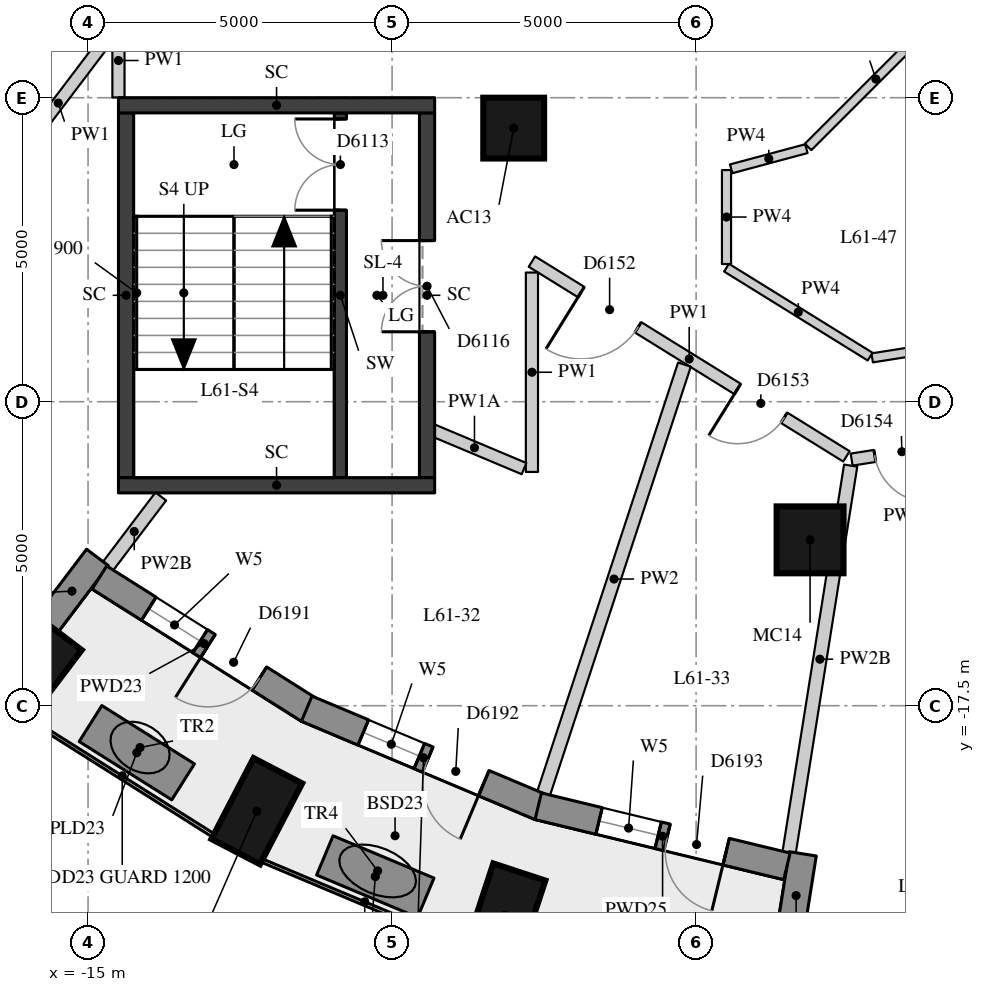
"""IFC4 building model, lengths in metres.
Left out: names, types, materials, properties, quantities, classifications, styles, units other than length and angle.
Written with IfcOpenShell. Run it as: python <this file> out.ifc"""

import sys

from ifc_helpers import new_model, si_unit, direction, frame, frame_2d, origin, origin_2d, place, context, subcontext, project, spatial, rectangle, extrude, element, fill, save


model = new_model("IFC4")
c1 = context("Model", 3, precision=1e-05, world=origin(), true_north=direction((0.0, 1.0)))
c2 = subcontext(c1, "Body", "Model", "MODEL_VIEW")
j1 = project(units=[si_unit("LENGTHUNIT", "METRE"), si_unit("PLANEANGLEUNIT", "RADIAN")], contexts=[c1])
p1 = place(None, origin())
s1 = spatial("IfcSite", under=j1, at=p1, CompositionType="ELEMENT")
p2 = place(p1, origin())
s2 = spatial("IfcBuilding", under=s1, at=p2, CompositionType="ELEMENT")
p3 = place(p2, frame((0.0, 0.0, 215.6)))
s3 = spatial("IfcBuildingStorey", under=s2, at=p3, CompositionType="ELEMENT", Elevation=215.6)
for number, where, z_axis, x_axis in (
    (1, (-15.916, -16.911, 0.0), (0.0, 0.0, 1.0), (-0.604, -0.797, 0.0)),
    (2, (-12.225, -19.235, 0.0), (0.0, 0.0, 1.0), (-0.462, -0.887, 0.0)),
    (3, (-8.141, -20.948, 0.0), (0.0, 0.0, 1.0), (-0.312, -0.95, 0.0)),
):
    element("IfcColumn", number, at=place(p3, frame(where, z_axis=z_axis, x_axis=x_axis)), inside=s3, PredefinedType="COLUMN", context=c2, shape_type="SweptSolid", body=[
        extrude(rectangle(XDim=1.5, YDim=0.9, at=origin_2d()), origin(), (0.0, 0.0, 1.0), 3.3),
    ])
p4 = place(p3, frame((-8.0, -8.0, 0.0), z_axis=(0.0, 0.0, 1.0), x_axis=(1.0, 0.0, 0.0)))
e4 = element("IfcColumn", 4, at=p4, inside=s3, PredefinedType="COLUMN", context=c2, shape_type="SweptSolid", body=[
    extrude(rectangle(XDim=1.0, YDim=1.0, at=origin_2d()), origin(), (0.0, 0.0, 1.0), 3.3),
])
p5 = place(p3, frame((-3.126, -14.772, 0.0), z_axis=(0.0, 0.0, 1.0), x_axis=(1.0, 0.0, 0.0)))
e5 = element("IfcColumn", 5, at=p5, inside=s3, PredefinedType="COLUMN", context=c2, shape_type="SweptSolid", body=[
    extrude(rectangle(XDim=1.1, YDim=1.1, at=origin_2d()), origin(), (0.0, 0.0, 1.0), 3.3),
])
p6 = place(p3, frame((-15.685, -16.17, 0.0), z_axis=(0.0, 0.0, 1.0), x_axis=(0.603644757989, 0.797253414011, 0.0)))
e6 = element("IfcWall", 6, at=p6, inside=s3, PredefinedType="SOLIDWALL", context=c2, shape_type="SweptSolid", body=[
    extrude(rectangle(XDim=1.391, YDim=0.45, at=frame_2d((0.695, 0.0))), origin(), (0.0, 0.0, 1.0), 2.57),
])
p7 = place(p3, frame((-3.464, -21.309, 0.0), z_axis=(0.0, 0.0, 1.0), x_axis=(0.157161757203, 0.98757287431, 0.0)))
e7 = element("IfcWall", 7, at=p7, inside=s3, PredefinedType="SOLIDWALL", context=c2, shape_type="SweptSolid", body=[
    extrude(rectangle(XDim=1.39, YDim=0.45, at=frame_2d((0.695, 0.0))), origin(), (0.0, 0.0, 1.0), 2.57),
])
p8 = place(p3, frame((-14.813, -15.392, 0.0), z_axis=(0.0, 0.0, 1.0), x_axis=(0.84545185308, -0.534051649303, 0.0)))
e8 = element("IfcWall", 8, at=p8, inside=s3, PredefinedType="SOLIDWALL", context=c2, shape_type="SweptSolid", body=[
    extrude(rectangle(XDim=4.071, YDim=0.45, at=frame_2d((2.036, 0.0))), origin(), (0.0, 0.0, 1.0), 3.02),
])
p9 = place(p8, frame((0.961, 0.0, 0.4)))
e9 = element("IfcOpeningElement", 9, at=p9, cuts=e8, PredefinedType="OPENING", context=c2, shape_type="SweptSolid", body=[
    extrude(rectangle(XDim=1.0, YDim=1.75, at=frame_2d((0.5, 0.875))), frame((0.0, 0.235, 0.0), z_axis=(0.0, -1.0, 0.0), x_axis=(1.0, 0.0, 0.0)), (0.0, 0.0, 1.0), 0.47),
])
p10 = place(p8, frame((2.111, 0.0, 0.0)))
e10 = element("IfcOpeningElement", 10, at=p10, cuts=e8, PredefinedType="OPENING", context=c2, shape_type="SweptSolid", body=[
    extrude(rectangle(XDim=1.0, YDim=2.15, at=frame_2d((0.5, 1.075))), frame((0.0, 0.235, 0.0), z_axis=(0.0, -1.0, 0.0), x_axis=(1.0, 0.0, 0.0)), (0.0, 0.0, 1.0), 0.47),
])
p11 = place(p3, frame((-11.404, -17.549, 0.0), z_axis=(0.0, 0.0, 1.0), x_axis=(0.921751093055, -0.387782055351, 0.0)))
e11 = element("IfcWall", 11, at=p11, inside=s3, PredefinedType="SOLIDWALL", context=c2, shape_type="SweptSolid", body=[
    extrude(rectangle(XDim=4.168, YDim=0.45, at=frame_2d((2.084, 0.0))), origin(), (0.0, 0.0, 1.0), 3.02),
])
p12 = place(p11, frame((1.009, 0.0, 0.4)))
e12 = element("IfcOpeningElement", 12, at=p12, cuts=e11, PredefinedType="OPENING", context=c2, shape_type="SweptSolid", body=[
    extrude(rectangle(XDim=1.0, YDim=1.75, at=frame_2d((0.5, 0.875))), frame((0.0, 0.235, 0.0), z_axis=(0.0, -1.0, 0.0), x_axis=(1.0, 0.0, 0.0)), (0.0, 0.0, 1.0), 0.47),
])
p13 = place(p11, frame((2.159, 0.0, 0.0)))
e13 = element("IfcOpeningElement", 13, at=p13, cuts=e11, PredefinedType="OPENING", context=c2, shape_type="SweptSolid", body=[
    extrude(rectangle(XDim=1.0, YDim=2.15, at=frame_2d((0.5, 1.075))), frame((0.0, 0.235, 0.0), z_axis=(0.0, -1.0, 0.0), x_axis=(1.0, 0.0, 0.0)), (0.0, 0.0, 1.0), 0.47),
])
p14 = place(p3, frame((-7.596, -19.154, 0.0), z_axis=(0.0, 0.0, 1.0), x_axis=(0.972004107579, -0.234963858602, 0.0)))
e14 = element("IfcWall", 14, at=p14, inside=s3, PredefinedType="SOLIDWALL", context=c2, shape_type="SweptSolid", body=[
    extrude(rectangle(XDim=4.207, YDim=0.45, at=frame_2d((2.104, 0.0))), origin(), (0.0, 0.0, 1.0), 3.02),
])
p15 = place(p14, frame((1.029, 0.0, 0.4)))
e15 = element("IfcOpeningElement", 15, at=p15, cuts=e14, PredefinedType="OPENING", context=c2, shape_type="SweptSolid", body=[
    extrude(rectangle(XDim=1.0, YDim=1.75, at=frame_2d((0.5, 0.875))), frame((0.0, 0.235, 0.0), z_axis=(0.0, -1.0, 0.0), x_axis=(1.0, 0.0, 0.0)), (0.0, 0.0, 1.0), 0.47),
])
p16 = place(p14, frame((2.179, 0.0, 0.0)))
e16 = element("IfcOpeningElement", 16, at=p16, cuts=e14, PredefinedType="OPENING", context=c2, shape_type="SweptSolid", body=[
    extrude(rectangle(XDim=1.0, YDim=2.15, at=frame_2d((0.5, 1.075))), frame((0.0, 0.235, 0.0), z_axis=(0.0, -1.0, 0.0), x_axis=(1.0, 0.0, 0.0)), (0.0, 0.0, 1.0), 0.47),
])
p17 = place(p3, frame((-14.96, -17.793, 0.0), z_axis=(0.0, 0.0, 1.0), x_axis=(0.846126379677, -0.532982316418, 0.0)))
e17 = element("IfcWall", 17, at=p17, inside=s3, PredefinedType="USERDEFINED", context=c2, shape_type="SweptSolid", body=[
    extrude(rectangle(XDim=1.8, YDim=0.7, at=frame_2d((0.9, 0.0))), origin(), (0.0, 0.0, 1.0), 0.75),
])
p18 = place(p3, frame((-11.106, -19.962, 0.0), z_axis=(0.0, 0.0, 1.0), x_axis=(0.922155368213, -0.386819695564, 0.0)))
e18 = element("IfcWall", 18, at=p18, inside=s3, PredefinedType="USERDEFINED", context=c2, shape_type="SweptSolid", body=[
    extrude(rectangle(XDim=1.8, YDim=0.7, at=frame_2d((0.9, 0.0))), origin(), (0.0, 0.0, 1.0), 0.75),
])
p19 = place(p3, frame((-10.85, -13.75, 0.0), z_axis=(0.0, 0.0, 1.0), x_axis=(0.0, 1.0, 0.0)))
e19 = element("IfcWall", 19, at=p19, inside=s3, PredefinedType="SHEAR", context=c2, shape_type="SweptSolid", body=[
    extrude(rectangle(XDim=6.0, YDim=0.2, at=frame_2d((3.0, 0.0))), origin(), (0.0, 0.0, 1.0), 3.02),
])
p20 = place(p19, frame((4.4, 0.0, 0.0)))
e20 = element("IfcOpeningElement", 20, at=p20, cuts=e19, PredefinedType="OPENING", context=c2, shape_type="SweptSolid", body=[
    extrude(rectangle(XDim=1.5, YDim=2.1, at=frame_2d((0.75, 1.05))), frame((0.0, 0.11, 0.0), z_axis=(0.0, -1.0, 0.0), x_axis=(1.0, 0.0, 0.0)), (0.0, 0.0, 1.0), 0.22),
])
p21 = place(p3, frame((-14.375, -13.75, -0.28), z_axis=(0.0, 0.0, 1.0), x_axis=(0.0, 1.0, 0.0)))
e21 = element("IfcWall", 21, at=p21, inside=s3, PredefinedType="SHEAR", context=c2, shape_type="SweptSolid", body=[
    extrude(rectangle(XDim=6.0, YDim=0.25, at=frame_2d((3.0, 0.0))), origin(), (0.0, 0.0, 1.0), 3.3),
])
p22 = place(p3, frame((-9.425, -13.75, -0.28), z_axis=(0.0, 0.0, 1.0), x_axis=(0.0, 1.0, 0.0)))
e22 = element("IfcWall", 22, at=p22, inside=s3, PredefinedType="SHEAR", context=c2, shape_type="SweptSolid", body=[
    extrude(rectangle(XDim=6.0, YDim=0.25, at=frame_2d((3.0, 0.0))), origin(), (0.0, 0.0, 1.0), 3.3),
])
p23 = place(p22, frame((2.4, 0.0, 0.28)))
e23 = element("IfcOpeningElement", 23, at=p23, cuts=e22, PredefinedType="OPENING", context=c2, shape_type="SweptSolid", body=[
    extrude(rectangle(XDim=1.5, YDim=2.1, at=frame_2d((0.75, 1.05))), frame((0.0, 0.135, 0.0), z_axis=(0.0, -1.0, 0.0), x_axis=(1.0, 0.0, 0.0)), (0.0, 0.0, 1.0), 0.27),
])
for number, where, z_axis, x_axis in (
    (24, (-14.5, -7.625, -0.28), (0.0, 0.0, 1.0), (1.0, 0.0, 0.0)),
    (25, (-14.5, -13.875, -0.28), (0.0, 0.0, 1.0), (1.0, 0.0, 0.0)),
):
    element("IfcWall", number, at=place(p3, frame(where, z_axis=z_axis, x_axis=x_axis)), inside=s3, PredefinedType="SHEAR", context=c2, shape_type="SweptSolid", body=[
        extrude(rectangle(XDim=5.2, YDim=0.25, at=frame_2d((2.6, 0.0))), origin(), (0.0, 0.0, 1.0), 3.3),
    ])
p24 = place(p3, frame((9.306, -11.603, 0.0), z_axis=(0.0, 0.0, 1.0), x_axis=(-0.987842562114, -0.155457622769, 0.0)))
e26 = element("IfcWall", 26, at=p24, inside=s3, PredefinedType="PARTITIONING", context=c2, shape_type="SweptSolid", body=[
    extrude(rectangle(XDim=11.893, YDim=0.2, at=frame_2d((5.947, 0.0))), origin(), (0.0, 0.0, 1.0), 3.02),
])
p25 = place(p24, frame((10.607, 0.0, 0.0)))
e27 = element("IfcOpeningElement", 27, at=p25, cuts=e26, PredefinedType="OPENING", context=c2, shape_type="SweptSolid", body=[
    extrude(rectangle(XDim=0.9, YDim=2.1, at=frame_2d((0.45, 1.05))), frame((0.0, 0.11, 0.0), z_axis=(0.0, -1.0, 0.0), x_axis=(1.0, 0.0, 0.0)), (0.0, 0.0, 1.0), 0.22),
])
p26 = place(p24, frame((5.829, 0.0, 0.0)))
e28 = element("IfcOpeningElement", 28, at=p26, cuts=e26, PredefinedType="OPENING", context=c2, shape_type="SweptSolid", body=[
    extrude(rectangle(XDim=0.9, YDim=2.1, at=frame_2d((0.45, 1.05))), frame((0.0, 0.11, 0.0), z_axis=(0.0, -1.0, 0.0), x_axis=(1.0, 0.0, 0.0)), (0.0, 0.0, 1.0), 0.22),
])
p27 = place(p24, frame((4.669, 0.0, 0.0)))
e29 = element("IfcOpeningElement", 29, at=p27, cuts=e26, PredefinedType="OPENING", context=c2, shape_type="SweptSolid", body=[
    extrude(rectangle(XDim=0.9, YDim=2.1, at=frame_2d((0.45, 1.05))), frame((0.0, 0.11, 0.0), z_axis=(0.0, -1.0, 0.0), x_axis=(1.0, 0.0, 0.0)), (0.0, 0.0, 1.0), 0.22),
])
p28 = place(p24, frame((0.14, 0.0, 0.0)))
e30 = element("IfcOpeningElement", 30, at=p28, cuts=e26, PredefinedType="OPENING", context=c2, shape_type="SweptSolid", body=[
    extrude(rectangle(XDim=1.1, YDim=2.1, at=frame_2d((0.55, 1.05))), frame((0.0, 0.11, 0.0), z_axis=(0.0, -1.0, 0.0), x_axis=(1.0, 0.0, 0.0)), (0.0, 0.0, 1.0), 0.22),
])
p29 = place(p3, frame((-2.528, -13.4, 0.0), z_axis=(0.0, 0.0, 1.0), x_axis=(-0.850088088191, 0.526640524757, 0.0)))
e31 = element("IfcWall", 31, at=p29, inside=s3, PredefinedType="PARTITIONING", context=c2, shape_type="SweptSolid", body=[
    extrude(rectangle(XDim=6.084, YDim=0.2, at=frame_2d((3.042, 0.0))), origin(), (0.0, 0.0, 1.0), 3.02),
])
p30 = place(p29, frame((4.031, 0.0, 0.0)))
e32 = element("IfcOpeningElement", 32, at=p30, cuts=e31, PredefinedType="OPENING", context=c2, shape_type="SweptSolid", body=[
    extrude(rectangle(XDim=1.1, YDim=2.1, at=frame_2d((0.55, 1.05))), frame((0.0, 0.11, 0.0), z_axis=(0.0, -1.0, 0.0), x_axis=(1.0, 0.0, 0.0)), (0.0, 0.0, 1.0), 0.22),
])
p31 = place(p29, frame((1.206, 0.0, 0.0)))
e33 = element("IfcOpeningElement", 33, at=p31, cuts=e31, PredefinedType="OPENING", context=c2, shape_type="SweptSolid", body=[
    extrude(rectangle(XDim=0.9, YDim=2.1, at=frame_2d((0.45, 1.05))), frame((0.0, 0.11, 0.0), z_axis=(0.0, -1.0, 0.0), x_axis=(1.0, 0.0, 0.0)), (0.0, 0.0, 1.0), 0.22),
])
p32 = place(p3, frame((-7.7, -10.375, 0.0), z_axis=(0.0, 0.0, 1.0), x_axis=(0.0, -1.0, 0.0)))
e34 = element("IfcWall", 34, at=p32, inside=s3, PredefinedType="PARTITIONING", context=c2, shape_type="SweptSolid", body=[
    extrude(rectangle(XDim=3.28, YDim=0.2, at=frame_2d((1.64, 0.0))), origin(), (0.0, 0.0, 1.0), 3.02),
])
p33 = place(p3, frame((-7.83, -13.601, 0.0), z_axis=(0.0, 0.0, 1.0), x_axis=(-0.921793770535, 0.387680596112, 0.0)))
e35 = element("IfcWall", 35, at=p33, inside=s3, PredefinedType="PARTITIONING", context=c2, shape_type="SweptSolid", body=[
    extrude(rectangle(XDim=1.769, YDim=0.2, at=frame_2d((0.885, 0.0))), origin(), (0.0, 0.0, 1.0), 2.57),
])
p34 = place(p3, frame((-14.5, -7.496, 0.0), z_axis=(0.0, 0.0, 1.0), x_axis=(0.0, 1.0, 0.0)))
e36 = element("IfcWall", 36, at=p34, inside=s3, PredefinedType="PARTITIONING", context=c2, shape_type="SweptSolid", body=[
    extrude(rectangle(XDim=1.216, YDim=0.2, at=frame_2d((0.608, 0.0))), origin(), (0.0, 0.0, 1.0), 3.02),
])
p35 = place(p3, frame((-14.679, -6.518, 0.0), z_axis=(0.0, 0.0, 1.0), x_axis=(-0.603820908912, -0.797120009761, 0.0)))
e37 = element("IfcWall", 37, at=p35, inside=s3, PredefinedType="PARTITIONING", context=c2, shape_type="SweptSolid", body=[
    extrude(rectangle(XDim=2.684, YDim=0.2, at=frame_2d((1.342, 0.0))), origin(), (0.0, 0.0, 1.0), 3.02),
])
p36 = place(p3, frame((0.921, -11.303, 0.0), z_axis=(0.0, 0.0, 1.0), x_axis=(-0.987854584084, -0.15538121091, 0.0)))
e38 = element("IfcWall", 38, at=p36, inside=s3, PredefinedType="PARTITIONING", context=c2, shape_type="SweptSolid", body=[
    extrude(rectangle(XDim=3.062, YDim=0.15, at=frame_2d((1.531, 0.0))), origin(), (0.0, 0.0, 1.0), 3.02),
])
p37 = place(p3, frame((-2.138, -11.758, 0.0), z_axis=(0.0, 0.0, 1.0), x_axis=(-0.850109654363, 0.526605711666, 0.0)))
e39 = element("IfcWall", 39, at=p37, inside=s3, PredefinedType="PARTITIONING", context=c2, shape_type="SweptSolid", body=[
    extrude(rectangle(XDim=2.778, YDim=0.15, at=frame_2d((1.389, 0.0))), origin(), (0.0, 0.0, 1.0), 3.02),
])
p38 = place(p3, frame((-4.5, -10.235, 0.0), z_axis=(0.0, 0.0, 1.0), x_axis=(0.0, 1.0, 0.0)))
e40 = element("IfcWall", 40, at=p38, inside=s3, PredefinedType="PARTITIONING", context=c2, shape_type="SweptSolid", body=[
    extrude(rectangle(XDim=1.545, YDim=0.15, at=frame_2d((0.772, 0.0))), origin(), (0.0, 0.0, 1.0), 3.02),
])
p39 = place(p3, frame((-4.423, -8.67, 0.0), z_axis=(0.0, 0.0, 1.0), x_axis=(0.965898680525, 0.258920333232, 0.0)))
e41 = element("IfcWall", 41, at=p39, inside=s3, PredefinedType="PARTITIONING", context=c2, shape_type="SweptSolid", body=[
    extrude(rectangle(XDim=1.281, YDim=0.15, at=frame_2d((0.64, 0.0))), origin(), (0.0, 0.0, 1.0), 3.02),
])
p40 = place(p3, frame((-3.158, -8.31, 0.0), z_axis=(0.0, 0.0, 1.0), x_axis=(0.707106781187, 0.707106781187, 0.0)))
e42 = element("IfcWall", 42, at=p40, inside=s3, PredefinedType="PARTITIONING", context=c2, shape_type="SweptSolid", body=[
    extrude(rectangle(XDim=3.154, YDim=0.15, at=frame_2d((1.577, 0.0))), origin(), (0.0, 0.0, 1.0), 3.02),
])
p41 = place(p3, frame((-22.896, -6.771, 0.0), z_axis=(0.0, 0.0, 1.0), x_axis=(0.92738233242, 0.374114968313, 0.0)))
e43 = element("IfcWall", 43, at=p41, inside=s3, PredefinedType="PARTITIONING", context=c2, shape_type="SweptSolid", body=[
    extrude(rectangle(XDim=8.246, YDim=0.22, at=frame_2d((4.123, 0.0))), origin(), (0.0, 0.0, 1.0), 3.02),
])
p42 = place(p3, frame((-14.677, -15.211, 0.0), z_axis=(0.0, 0.0, 1.0), x_axis=(0.603665965776, 0.797237355976, 0.0)))
e44 = element("IfcWall", 44, at=p42, inside=s3, PredefinedType="PARTITIONING", context=c2, shape_type="SweptSolid", body=[
    extrude(rectangle(XDim=1.447, YDim=0.22, at=frame_2d((0.723, 0.0))), origin(), (0.0, 0.0, 1.0), 2.57),
])
p43 = place(p3, frame((-7.508, -18.944, 0.0), z_axis=(0.0, 0.0, 1.0), x_axis=(0.311962912662, 0.950094280124, 0.0)))
e45 = element("IfcWall", 45, at=p43, inside=s3, PredefinedType="PARTITIONING", context=c2, shape_type="SweptSolid", body=[
    extrude(rectangle(XDim=7.425, YDim=0.22, at=frame_2d((3.712, 0.0))), origin(), (0.0, 0.0, 1.0), 3.02),
])
p44 = place(p3, frame((-3.471, -19.919, 0.0), z_axis=(0.0, 0.0, 1.0), x_axis=(0.157082319053, 0.987585512774, 0.0)))
e46 = element("IfcWall", 46, at=p44, inside=s3, PredefinedType="PARTITIONING", context=c2, shape_type="SweptSolid", body=[
    extrude(rectangle(XDim=6.448, YDim=0.22, at=frame_2d((3.224, 0.0))), origin(), (0.0, 0.0, 1.0), 2.57),
])
p45 = place(p9, origin())
e47 = element("IfcWindow", 47, at=p45, inside=s3, PartitioningType="SINGLE_PANEL", PredefinedType="WINDOW", context=c2, shape_type="SweptSolid", body=[
    extrude(rectangle(XDim=1.0, YDim=1.75, at=frame_2d((0.5, 0.875))), frame((0.0, 0.035, 0.0), z_axis=(0.0, -1.0, 0.0), x_axis=(1.0, 0.0, 0.0)), (0.0, 0.0, 1.0), 0.06),
])
fill(e9, e47)
p46 = place(p10, frame((1.0, 0.0, 0.0), z_axis=(0.0, 0.0, 1.0), x_axis=(-1.0, 0.0, 0.0)))
e48 = element("IfcDoor", 48, at=p46, inside=s3, OperationType="SINGLE_SWING_RIGHT", PredefinedType="DOOR", context=c2, shape_type="SweptSolid", body=[
    extrude(rectangle(XDim=1.0, YDim=2.15, at=frame_2d((0.5, 1.075))), frame((0.0, 0.075, 0.0), z_axis=(0.0, -1.0, 0.0), x_axis=(1.0, 0.0, 0.0)), (0.0, 0.0, 1.0), 0.05),
])
fill(e10, e48)
p47 = place(p12, origin())
e49 = element("IfcWindow", 49, at=p47, inside=s3, PartitioningType="SINGLE_PANEL", PredefinedType="WINDOW", context=c2, shape_type="SweptSolid", body=[
    extrude(rectangle(XDim=1.0, YDim=1.75, at=frame_2d((0.5, 0.875))), frame((0.0, 0.035, 0.0), z_axis=(0.0, -1.0, 0.0), x_axis=(1.0, 0.0, 0.0)), (0.0, 0.0, 1.0), 0.06),
])
fill(e12, e49)
p48 = place(p13, frame((1.0, 0.0, 0.0), z_axis=(0.0, 0.0, 1.0), x_axis=(-1.0, 0.0, 0.0)))
e50 = element("IfcDoor", 50, at=p48, inside=s3, OperationType="SINGLE_SWING_LEFT", PredefinedType="DOOR", context=c2, shape_type="SweptSolid", body=[
    extrude(rectangle(XDim=1.0, YDim=2.15, at=frame_2d((0.5, 1.075))), frame((0.0, 0.075, 0.0), z_axis=(0.0, -1.0, 0.0), x_axis=(1.0, 0.0, 0.0)), (0.0, 0.0, 1.0), 0.05),
])
fill(e13, e50)
p49 = place(p15, origin())
e51 = element("IfcWindow", 51, at=p49, inside=s3, PartitioningType="SINGLE_PANEL", PredefinedType="WINDOW", context=c2, shape_type="SweptSolid", body=[
    extrude(rectangle(XDim=1.0, YDim=1.75, at=frame_2d((0.5, 0.875))), frame((0.0, 0.035, 0.0), z_axis=(0.0, -1.0, 0.0), x_axis=(1.0, 0.0, 0.0)), (0.0, 0.0, 1.0), 0.06),
])
fill(e15, e51)
p50 = place(p16, frame((1.0, 0.0, 0.0), z_axis=(0.0, 0.0, 1.0), x_axis=(-1.0, 0.0, 0.0)))
e52 = element("IfcDoor", 52, at=p50, inside=s3, OperationType="SINGLE_SWING_LEFT", PredefinedType="DOOR", context=c2, shape_type="SweptSolid", body=[
    extrude(rectangle(XDim=1.0, YDim=2.15, at=frame_2d((0.5, 1.075))), frame((0.0, 0.075, 0.0), z_axis=(0.0, -1.0, 0.0), x_axis=(1.0, 0.0, 0.0)), (0.0, 0.0, 1.0), 0.05),
])
fill(e16, e52)
p51 = place(p20, origin())
e53 = element("IfcDoor", 53, at=p51, inside=s3, OperationType="DOUBLE_DOOR_SINGLE_SWING", PredefinedType="DOOR", context=c2, shape_type="SweptSolid", body=[
    extrude(rectangle(XDim=1.5, YDim=2.1, at=frame_2d((0.75, 1.05))), frame((0.0, 0.025, 0.0), z_axis=(0.0, -1.0, 0.0), x_axis=(1.0, 0.0, 0.0)), (0.0, 0.0, 1.0), 0.05),
])
fill(e20, e53)
p52 = place(p23, origin())
e54 = element("IfcDoor", 54, at=p52, inside=s3, OperationType="DOUBLE_DOOR_SINGLE_SWING", PredefinedType="DOOR", context=c2, shape_type="SweptSolid", body=[
    extrude(rectangle(XDim=1.5, YDim=2.1, at=frame_2d((0.75, 1.05))), frame((0.0, 0.025, 0.0), z_axis=(0.0, -1.0, 0.0), x_axis=(1.0, 0.0, 0.0)), (0.0, 0.0, 1.0), 0.05),
])
fill(e23, e54)
p53 = place(p30, origin())
e55 = element("IfcDoor", 55, at=p53, inside=s3, OperationType="SINGLE_SWING_RIGHT", PredefinedType="DOOR", context=c2, shape_type="SweptSolid", body=[
    extrude(rectangle(XDim=1.1, YDim=2.1, at=frame_2d((0.55, 1.05))), frame((0.0, 0.025, 0.0), z_axis=(0.0, -1.0, 0.0), x_axis=(1.0, 0.0, 0.0)), (0.0, 0.0, 1.0), 0.05),
])
fill(e32, e55)
p54 = place(p31, origin())
e56 = element("IfcDoor", 56, at=p54, inside=s3, OperationType="SINGLE_SWING_RIGHT", PredefinedType="DOOR", context=c2, shape_type="SweptSolid", body=[
    extrude(rectangle(XDim=0.9, YDim=2.1, at=frame_2d((0.45, 1.05))), frame((0.0, 0.025, 0.0), z_axis=(0.0, -1.0, 0.0), x_axis=(1.0, 0.0, 0.0)), (0.0, 0.0, 1.0), 0.05),
])
fill(e33, e56)
p55 = place(p25, origin())
e57 = element("IfcDoor", 57, at=p55, inside=s3, OperationType="SINGLE_SWING_LEFT", PredefinedType="DOOR", context=c2, shape_type="SweptSolid", body=[
    extrude(rectangle(XDim=0.9, YDim=2.1, at=frame_2d((0.45, 1.05))), frame((0.0, 0.025, 0.0), z_axis=(0.0, -1.0, 0.0), x_axis=(1.0, 0.0, 0.0)), (0.0, 0.0, 1.0), 0.05),
])
fill(e27, e57)
save(model, sys.argv[1])
